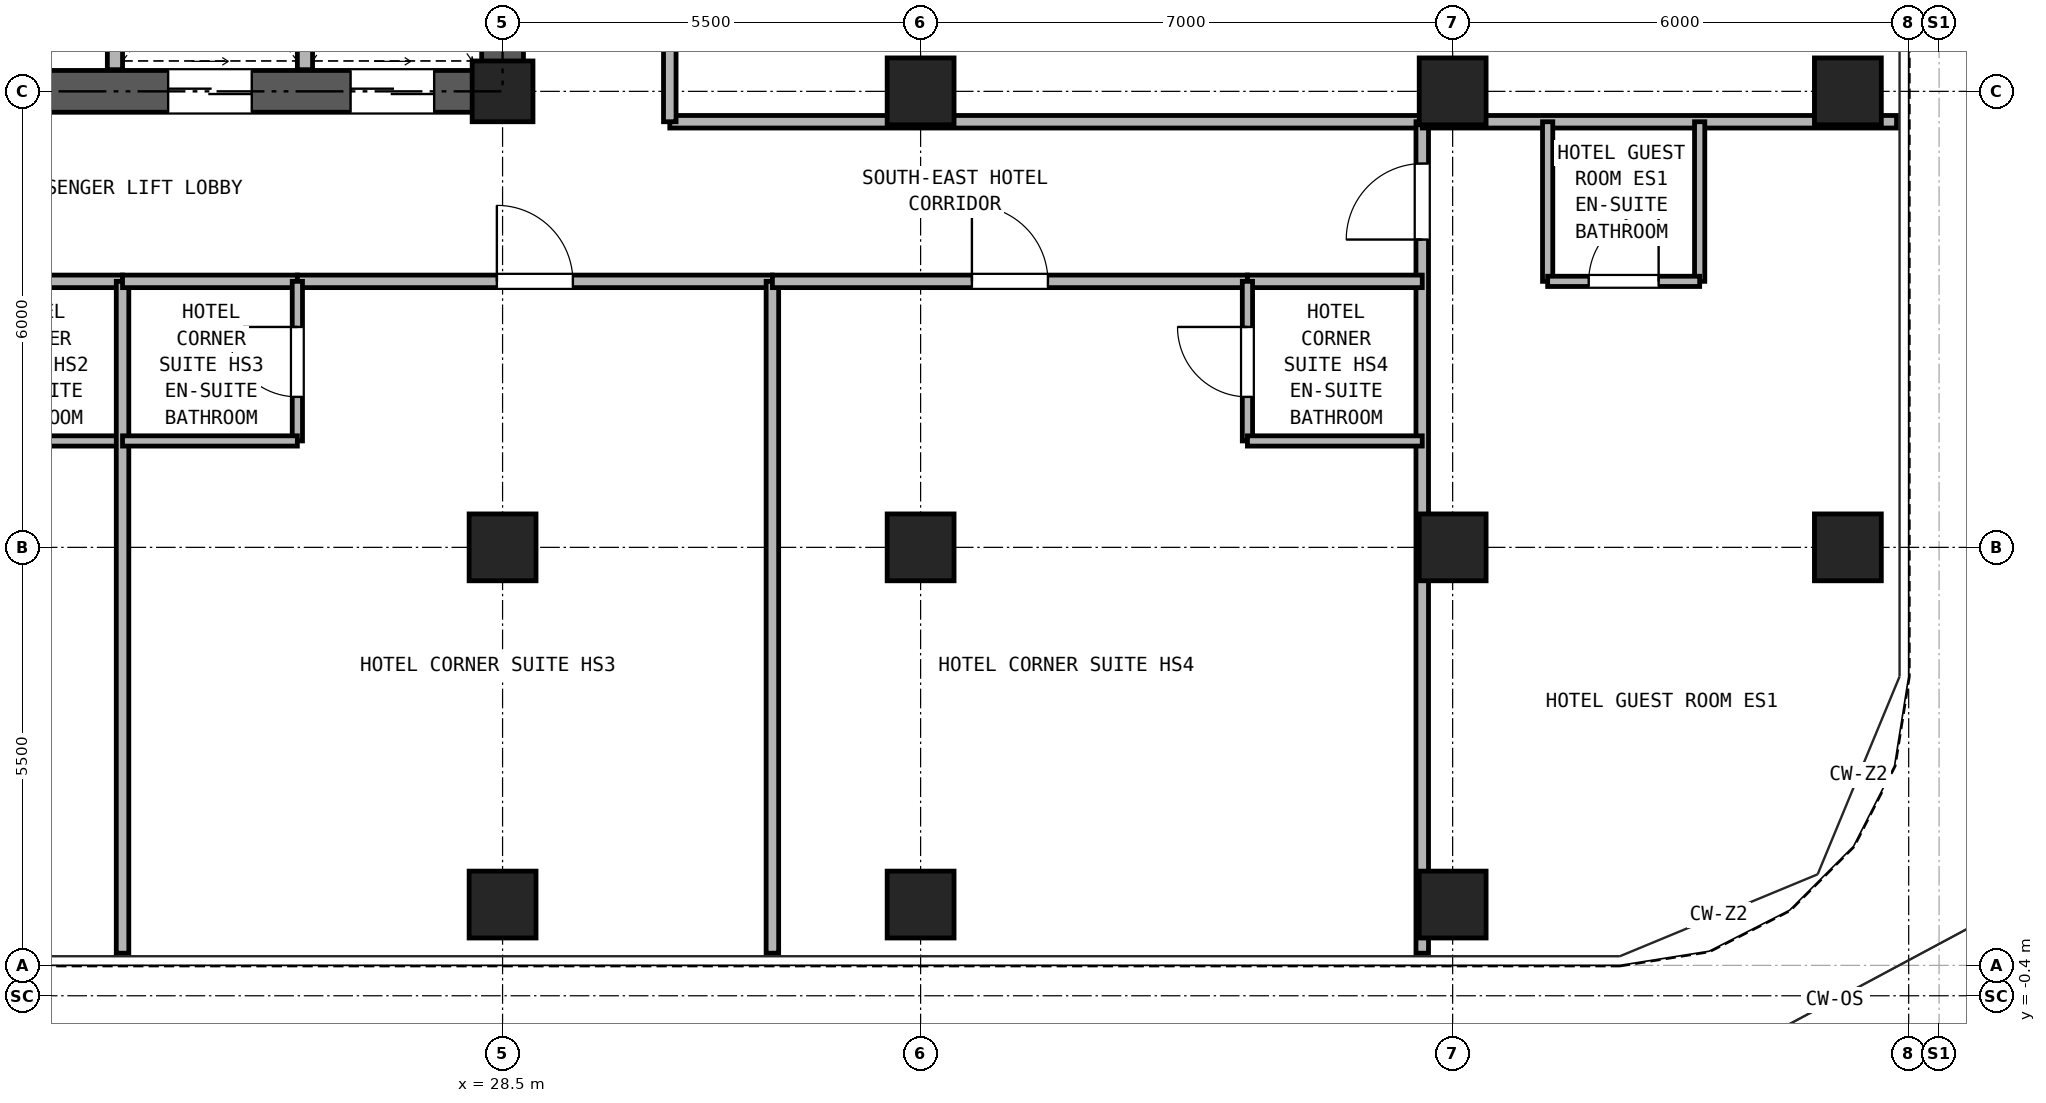
"""IFC4 building model, lengths in metres.
Left out: names, types, materials, properties, quantities, classifications, styles, units other than length and angle.
Written with IfcOpenShell. Run it as: python <this file> out.ifc"""

import sys

from ifc_helpers import new_model, si_unit, direction, frame, frame_2d, origin, origin_2d, place, context, subcontext, project, spatial, rectangle, hollow_rectangle, extrude, source, transform, mapped, element, fill, save


model = new_model("IFC4")
c1 = context("Model", 3, precision=1e-05, world=origin(), true_north=direction((0.0, 1.0)))
c2 = subcontext(c1, "Body", "Model", "MODEL_VIEW")
j1 = project(units=[si_unit("LENGTHUNIT", "METRE"), si_unit("PLANEANGLEUNIT", "RADIAN")], contexts=[c1])
p1 = place(None, origin())
s1 = spatial("IfcSite", under=j1, at=p1, CompositionType="ELEMENT")
p2 = place(p1, origin())
s2 = spatial("IfcBuilding", under=s1, at=p2, CompositionType="ELEMENT")
p3 = place(p2, frame((0.0, 0.0, 108.7)))
s3 = spatial("IfcBuildingStorey", under=s2, at=p3, CompositionType="ELEMENT", Elevation=108.7)
m1 = source(origin(), c2, "Body", "SweptSolid", [
    extrude(hollow_rectangle(XDim=0.88, YDim=0.88, WallThickness=0.05, at=origin_2d()), origin(), (0.0, 0.0, 1.0), 2.95),
])
for number, where, z_axis, x_axis in (
    (1, (28.5, 0.8, 0.0), (0.0, 0.0, 1.0), (1.0, 0.0, 0.0)),
    (2, (34.0, 0.8, 0.0), (0.0, 0.0, 1.0), (1.0, 0.0, 0.0)),
    (3, (41.0, 0.8, 0.0), (0.0, 0.0, 1.0), (1.0, 0.0, 0.0)),
    (4, (46.2, 5.5, 0.0), (0.0, 0.0, 1.0), (1.0, 0.0, 0.0)),
    (5, (46.2, 11.5, 0.0), (0.0, 0.0, 1.0), (1.0, 0.0, 0.0)),
    (6, (28.5, 5.5, 0.0), (0.0, 0.0, 1.0), (1.0, 0.0, 0.0)),
):
    element("IfcColumn", number, at=place(p3, frame(where, z_axis=z_axis, x_axis=x_axis)), inside=s3, PredefinedType="COLUMN", context=c2, shape_type="MappedRepresentation", body=[
        mapped(m1, transform((0.0, 0.0, 0.0), x_axis=(1.0, 0.0, 0.0), y_axis=(0.0, 1.0, 0.0), z_axis=(0.0, 0.0, 1.0), scale=1.0)),
    ])
m2 = source(origin(), c2, "Body", "SweptSolid", [
    extrude(hollow_rectangle(XDim=0.8, YDim=0.8, WallThickness=0.045, at=origin_2d()), origin(), (0.0, 0.0, 1.0), 2.95),
])
p4 = place(p3, frame((28.5, 11.5, 0.0), z_axis=(0.0, 0.0, 1.0), x_axis=(1.0, 0.0, 0.0)))
e7 = element("IfcColumn", 7, at=p4, inside=s3, PredefinedType="COLUMN", context=c2, shape_type="MappedRepresentation", body=[
    mapped(m2, transform((0.0, 0.0, 0.0), x_axis=(1.0, 0.0, 0.0), y_axis=(0.0, 1.0, 0.0), z_axis=(0.0, 0.0, 1.0), scale=1.0)),
])
for number, where, z_axis, x_axis in (
    (8, (34.0, 5.5, 0.0), (0.0, 0.0, 1.0), (1.0, 0.0, 0.0)),
    (9, (34.0, 11.5, 0.0), (0.0, 0.0, 1.0), (1.0, 0.0, 0.0)),
    (10, (41.0, 5.5, 0.0), (0.0, 0.0, 1.0), (1.0, 0.0, 0.0)),
    (11, (41.0, 11.5, 0.0), (0.0, 0.0, 1.0), (1.0, 0.0, 0.0)),
):
    element("IfcColumn", number, at=place(p3, frame(where, z_axis=z_axis, x_axis=x_axis)), inside=s3, PredefinedType="COLUMN", context=c2, shape_type="MappedRepresentation", body=[
        mapped(m1, transform((0.0, 0.0, 0.0), x_axis=(1.0, 0.0, 0.0), y_axis=(0.0, 1.0, 0.0), z_axis=(0.0, 0.0, 1.0), scale=1.0)),
    ])
p5 = place(p3, frame((18.225, 11.5, 0.0), z_axis=(0.0, 0.0, 1.0), x_axis=(1.0, 0.0, 0.0)))
e12 = element("IfcWall", 12, at=p5, inside=s3, PredefinedType="SHEAR", context=c2, shape_type="SweptSolid", body=[
    extrude(rectangle(XDim=10.55, YDim=0.55, at=frame_2d((5.275, 0.0))), origin(), (0.0, 0.0, 1.0), 2.95),
])
p6 = place(p5, frame((2.375, 0.0, 0.0)))
e13 = element("IfcOpeningElement", 13, at=p6, cuts=e12, PredefinedType="OPENING", context=c2, shape_type="SweptSolid", body=[
    extrude(rectangle(XDim=0.95, YDim=2.15, at=frame_2d((0.475, 1.075))), frame((0.0, 0.285, 0.0), z_axis=(0.0, -1.0, 0.0), x_axis=(1.0, 0.0, 0.0)), (0.0, 0.0, 1.0), 0.57),
])
p7 = place(p5, frame((5.875, 0.0, 0.0)))
e14 = element("IfcOpeningElement", 14, at=p7, cuts=e12, PredefinedType="OPENING", context=c2, shape_type="SweptSolid", body=[
    extrude(rectangle(XDim=1.1, YDim=2.25, at=frame_2d((0.55, 1.125))), frame((0.0, 0.285, 0.0), z_axis=(0.0, -1.0, 0.0), x_axis=(1.0, 0.0, 0.0)), (0.0, 0.0, 1.0), 0.57),
])
p8 = place(p5, frame((8.275, 0.0, 0.0)))
e15 = element("IfcOpeningElement", 15, at=p8, cuts=e12, PredefinedType="OPENING", context=c2, shape_type="SweptSolid", body=[
    extrude(rectangle(XDim=1.1, YDim=2.25, at=frame_2d((0.55, 1.125))), frame((0.0, 0.285, 0.0), z_axis=(0.0, -1.0, 0.0), x_axis=(1.0, 0.0, 0.0)), (0.0, 0.0, 1.0), 0.57),
])
p9 = place(p3, frame((28.5, 11.775, 0.0), z_axis=(0.0, 0.0, 1.0), x_axis=(0.0, 1.0, 0.0)))
e16 = element("IfcWall", 16, at=p9, inside=s3, PredefinedType="SHEAR", context=c2, shape_type="SweptSolid", body=[
    extrude(rectangle(XDim=16.7, YDim=0.55, at=frame_2d((8.35, 0.0))), origin(), (0.0, 0.0, 1.0), 2.95),
])
p10 = place(p9, frame((7.375, 0.0, 0.0)))
e17 = element("IfcOpeningElement", 17, at=p10, cuts=e16, PredefinedType="OPENING", context=c2, shape_type="SweptSolid", body=[
    extrude(rectangle(XDim=1.15, YDim=2.2, at=frame_2d((0.575, 1.1))), frame((0.0, 0.285, 0.0), z_axis=(0.0, -1.0, 0.0), x_axis=(1.0, 0.0, 0.0)), (0.0, 0.0, 1.0), 0.57),
])
for number, where, z_axis, x_axis in (
    (18, (23.4, 11.785, 0.0), (0.0, 0.0, 1.0), (0.0, 1.0, 0.0)),
    (19, (25.9, 11.785, 0.0), (0.0, 0.0, 1.0), (0.0, 1.0, 0.0)),
):
    element("IfcWall", number, at=place(p3, frame(where, z_axis=z_axis, x_axis=x_axis)), inside=s3, PredefinedType="PARTITIONING", context=c2, shape_type="SweptSolid", body=[
        extrude(rectangle(XDim=3.215, YDim=0.2, at=frame_2d((1.607, 0.0))), origin(), (0.0, 0.0, 1.0), 2.95),
    ])
p11 = place(p3, frame((30.7, 11.1, 0.0), z_axis=(0.0, 0.0, 1.0), x_axis=(1.0, 0.0, 0.0)))
e20 = element("IfcWall", 20, at=p11, inside=s3, PredefinedType="PARTITIONING", context=c2, shape_type="SweptSolid", body=[
    extrude(rectangle(XDim=9.9, YDim=0.165, at=frame_2d((4.95, 0.0))), origin(), (0.0, 0.0, 1.0), 2.95),
])
p12 = place(p3, frame((30.7, 11.1, 0.0), z_axis=(0.0, 0.0, 1.0), x_axis=(0.0, 1.0, 0.0)))
e21 = element("IfcWall", 21, at=p12, inside=s3, PredefinedType="PARTITIONING", context=c2, shape_type="SweptSolid", body=[
    extrude(rectangle(XDim=18.45, YDim=0.165, at=frame_2d((9.225, 0.0))), origin(), (0.0, 0.0, 1.0), 2.95),
])
p13 = place(p12, frame((4.112, 0.0, 0.0)))
e22 = element("IfcOpeningElement", 22, at=p13, cuts=e21, PredefinedType="OPENING", context=c2, shape_type="SweptSolid", body=[
    extrude(rectangle(XDim=0.95, YDim=2.15, at=frame_2d((0.475, 1.075))), frame((0.0, 0.093, 0.0), z_axis=(0.0, -1.0, 0.0), x_axis=(1.0, 0.0, 0.0)), (0.0, 0.0, 1.0), 0.185),
])
p14 = place(p12, frame((13.338, 0.0, 0.0)))
e23 = element("IfcOpeningElement", 23, at=p14, cuts=e21, PredefinedType="OPENING", context=c2, shape_type="SweptSolid", body=[
    extrude(rectangle(XDim=0.95, YDim=2.15, at=frame_2d((0.475, 1.075))), frame((0.0, 0.093, 0.0), z_axis=(0.0, -1.0, 0.0), x_axis=(1.0, 0.0, 0.0)), (0.0, 0.0, 1.0), 0.185),
])
p15 = place(p3, frame((40.6, 0.16, 0.0), z_axis=(0.0, 0.0, 1.0), x_axis=(0.0, 1.0, 0.0)))
e24 = element("IfcWall", 24, at=p15, inside=s3, PredefinedType="PARTITIONING", context=c2, shape_type="SweptSolid", body=[
    extrude(rectangle(XDim=10.94, YDim=0.165, at=frame_2d((5.47, 0.0))), origin(), (0.0, 0.0, 1.0), 2.95),
])
p16 = place(p15, frame((9.39, 0.0, 0.0)))
e25 = element("IfcOpeningElement", 25, at=p16, cuts=e24, PredefinedType="OPENING", context=c2, shape_type="SweptSolid", body=[
    extrude(rectangle(XDim=1.0, YDim=2.15, at=frame_2d((0.5, 1.075))), frame((0.0, 0.093, 0.0), z_axis=(0.0, -1.0, 0.0), x_axis=(1.0, 0.0, 0.0)), (0.0, 0.0, 1.0), 0.185),
])
p17 = place(p3, frame((40.6, 11.1, 0.0), z_axis=(0.0, 0.0, 1.0), x_axis=(1.0, 0.0, 0.0)))
e26 = element("IfcWall", 26, at=p17, inside=s3, PredefinedType="PARTITIONING", context=c2, shape_type="SweptSolid", body=[
    extrude(rectangle(XDim=6.24, YDim=0.165, at=frame_2d((3.12, 0.0))), origin(), (0.0, 0.0, 1.0), 2.95),
])
for number, where, z_axis, x_axis in (
    (27, (42.25, 9.0, 0.0), (0.0, 0.0, 1.0), (0.0, 1.0, 0.0)),
    (28, (44.25, 9.0, 0.0), (0.0, 0.0, 1.0), (0.0, 1.0, 0.0)),
):
    element("IfcWall", number, at=place(p3, frame(where, z_axis=z_axis, x_axis=x_axis)), inside=s3, PredefinedType="PARTITIONING", context=c2, shape_type="SweptSolid", body=[
        extrude(rectangle(XDim=2.1, YDim=0.135, at=frame_2d((1.05, 0.0))), origin(), (0.0, 0.0, 1.0), 2.95),
    ])
p18 = place(p3, frame((42.25, 9.0, 0.0), z_axis=(0.0, 0.0, 1.0), x_axis=(1.0, 0.0, 0.0)))
e29 = element("IfcWall", 29, at=p18, inside=s3, PredefinedType="PARTITIONING", context=c2, shape_type="SweptSolid", body=[
    extrude(rectangle(XDim=2.0, YDim=0.135, at=frame_2d((1.0, 0.0))), origin(), (0.0, 0.0, 1.0), 2.95),
])
p19 = place(p18, frame((0.54, 0.0, 0.0)))
e30 = element("IfcOpeningElement", 30, at=p19, cuts=e29, PredefinedType="OPENING", context=c2, shape_type="SweptSolid", body=[
    extrude(rectangle(XDim=0.92, YDim=2.1, at=frame_2d((0.46, 1.05))), frame((0.0, 0.077, 0.0), z_axis=(0.0, -1.0, 0.0), x_axis=(1.0, 0.0, 0.0)), (0.0, 0.0, 1.0), 0.155),
])
p20 = place(p3, frame((21.2, 9.0, 0.0), z_axis=(0.0, 0.0, 1.0), x_axis=(1.0, 0.0, 0.0)))
e31 = element("IfcWall", 31, at=p20, inside=s3, PredefinedType="PARTITIONING", context=c2, shape_type="SweptSolid", body=[
    extrude(rectangle(XDim=2.3, YDim=0.165, at=frame_2d((1.15, 0.0))), origin(), (0.0, 0.0, 1.0), 2.95),
])
p21 = place(p3, frame((21.2, 6.9, 0.0), z_axis=(0.0, 0.0, 1.0), x_axis=(1.0, 0.0, 0.0)))
e32 = element("IfcWall", 32, at=p21, inside=s3, PredefinedType="PARTITIONING", context=c2, shape_type="SweptSolid", body=[
    extrude(rectangle(XDim=2.3, YDim=0.135, at=frame_2d((1.15, 0.0))), origin(), (0.0, 0.0, 1.0), 2.95),
])
p22 = place(p3, frame((23.5, 0.16, 0.0), z_axis=(0.0, 0.0, 1.0), x_axis=(0.0, 1.0, 0.0)))
e33 = element("IfcWall", 33, at=p22, inside=s3, PredefinedType="PARTITIONING", context=c2, shape_type="SweptSolid", body=[
    extrude(rectangle(XDim=8.84, YDim=0.165, at=frame_2d((4.42, 0.0))), origin(), (0.0, 0.0, 1.0), 2.95),
])
p23 = place(p3, frame((23.5, 9.0, 0.0), z_axis=(0.0, 0.0, 1.0), x_axis=(1.0, 0.0, 0.0)))
e34 = element("IfcWall", 34, at=p23, inside=s3, PredefinedType="PARTITIONING", context=c2, shape_type="SweptSolid", body=[
    extrude(rectangle(XDim=2.3, YDim=0.165, at=frame_2d((1.15, 0.0))), origin(), (0.0, 0.0, 1.0), 2.95),
])
p24 = place(p3, frame((25.8, 9.0, 0.0), z_axis=(0.0, 0.0, 1.0), x_axis=(1.0, 0.0, 0.0)))
e35 = element("IfcWall", 35, at=p24, inside=s3, PredefinedType="PARTITIONING", context=c2, shape_type="SweptSolid", body=[
    extrude(rectangle(XDim=6.25, YDim=0.165, at=frame_2d((3.125, 0.0))), origin(), (0.0, 0.0, 1.0), 2.95),
])
p25 = place(p24, frame((2.625, 0.0, 0.0)))
e36 = element("IfcOpeningElement", 36, at=p25, cuts=e35, PredefinedType="OPENING", context=c2, shape_type="SweptSolid", body=[
    extrude(rectangle(XDim=1.0, YDim=2.15, at=frame_2d((0.5, 1.075))), frame((0.0, 0.093, 0.0), z_axis=(0.0, -1.0, 0.0), x_axis=(1.0, 0.0, 0.0)), (0.0, 0.0, 1.0), 0.185),
])
p26 = place(p3, frame((25.8, 6.9, 0.0), z_axis=(0.0, 0.0, 1.0), x_axis=(0.0, 1.0, 0.0)))
e37 = element("IfcWall", 37, at=p26, inside=s3, PredefinedType="PARTITIONING", context=c2, shape_type="SweptSolid", body=[
    extrude(rectangle(XDim=2.1, YDim=0.135, at=frame_2d((1.05, 0.0))), origin(), (0.0, 0.0, 1.0), 2.95),
])
p27 = place(p26, frame((0.58, 0.0, 0.0)))
e38 = element("IfcOpeningElement", 38, at=p27, cuts=e37, PredefinedType="OPENING", context=c2, shape_type="SweptSolid", body=[
    extrude(rectangle(XDim=0.92, YDim=2.1, at=frame_2d((0.46, 1.05))), frame((0.0, 0.077, 0.0), z_axis=(0.0, -1.0, 0.0), x_axis=(1.0, 0.0, 0.0)), (0.0, 0.0, 1.0), 0.155),
])
p28 = place(p3, frame((23.5, 6.9, 0.0), z_axis=(0.0, 0.0, 1.0), x_axis=(1.0, 0.0, 0.0)))
e39 = element("IfcWall", 39, at=p28, inside=s3, PredefinedType="PARTITIONING", context=c2, shape_type="SweptSolid", body=[
    extrude(rectangle(XDim=2.3, YDim=0.135, at=frame_2d((1.15, 0.0))), origin(), (0.0, 0.0, 1.0), 2.95),
])
p29 = place(p3, frame((32.05, 0.16, 0.0), z_axis=(0.0, 0.0, 1.0), x_axis=(0.0, 1.0, 0.0)))
e40 = element("IfcWall", 40, at=p29, inside=s3, PredefinedType="PARTITIONING", context=c2, shape_type="SweptSolid", body=[
    extrude(rectangle(XDim=8.84, YDim=0.165, at=frame_2d((4.42, 0.0))), origin(), (0.0, 0.0, 1.0), 2.95),
])
p30 = place(p3, frame((38.3, 9.0, 0.0), z_axis=(0.0, 0.0, 1.0), x_axis=(1.0, 0.0, 0.0)))
e41 = element("IfcWall", 41, at=p30, inside=s3, PredefinedType="PARTITIONING", context=c2, shape_type="SweptSolid", body=[
    extrude(rectangle(XDim=2.3, YDim=0.165, at=frame_2d((1.15, 0.0))), origin(), (0.0, 0.0, 1.0), 2.95),
])
p31 = place(p3, frame((32.05, 9.0, 0.0), z_axis=(0.0, 0.0, 1.0), x_axis=(1.0, 0.0, 0.0)))
e42 = element("IfcWall", 42, at=p31, inside=s3, PredefinedType="PARTITIONING", context=c2, shape_type="SweptSolid", body=[
    extrude(rectangle(XDim=6.25, YDim=0.165, at=frame_2d((3.125, 0.0))), origin(), (0.0, 0.0, 1.0), 2.95),
])
p32 = place(p31, frame((2.625, 0.0, 0.0)))
e43 = element("IfcOpeningElement", 43, at=p32, cuts=e42, PredefinedType="OPENING", context=c2, shape_type="SweptSolid", body=[
    extrude(rectangle(XDim=1.0, YDim=2.15, at=frame_2d((0.5, 1.075))), frame((0.0, 0.093, 0.0), z_axis=(0.0, -1.0, 0.0), x_axis=(1.0, 0.0, 0.0)), (0.0, 0.0, 1.0), 0.185),
])
p33 = place(p3, frame((38.3, 6.9, 0.0), z_axis=(0.0, 0.0, 1.0), x_axis=(0.0, 1.0, 0.0)))
e44 = element("IfcWall", 44, at=p33, inside=s3, PredefinedType="PARTITIONING", context=c2, shape_type="SweptSolid", body=[
    extrude(rectangle(XDim=2.1, YDim=0.135, at=frame_2d((1.05, 0.0))), origin(), (0.0, 0.0, 1.0), 2.95),
])
p34 = place(p33, frame((0.58, 0.0, 0.0)))
e45 = element("IfcOpeningElement", 45, at=p34, cuts=e44, PredefinedType="OPENING", context=c2, shape_type="SweptSolid", body=[
    extrude(rectangle(XDim=0.92, YDim=2.1, at=frame_2d((0.46, 1.05))), frame((0.0, 0.077, 0.0), z_axis=(0.0, -1.0, 0.0), x_axis=(1.0, 0.0, 0.0)), (0.0, 0.0, 1.0), 0.155),
])
p35 = place(p3, frame((38.3, 6.9, 0.0), z_axis=(0.0, 0.0, 1.0), x_axis=(1.0, 0.0, 0.0)))
e46 = element("IfcWall", 46, at=p35, inside=s3, PredefinedType="PARTITIONING", context=c2, shape_type="SweptSolid", body=[
    extrude(rectangle(XDim=2.3, YDim=0.135, at=frame_2d((1.15, 0.0))), origin(), (0.0, 0.0, 1.0), 2.95),
])
p36 = place(p7, frame((1.1, 0.0, 0.0), z_axis=(0.0, 0.0, 1.0), x_axis=(-1.0, 0.0, 0.0)))
e47 = element("IfcDoor", 47, at=p36, inside=s3, OperationType="DOUBLE_DOOR_SLIDING", PredefinedType="DOOR", context=c2, shape_type="SweptSolid", body=[
    extrude(rectangle(XDim=1.1, YDim=2.25, at=frame_2d((0.55, 1.125))), frame((0.0, 0.025, 0.0), z_axis=(0.0, -1.0, 0.0), x_axis=(1.0, 0.0, 0.0)), (0.0, 0.0, 1.0), 0.05),
])
fill(e14, e47)
p37 = place(p8, frame((1.1, 0.0, 0.0), z_axis=(0.0, 0.0, 1.0), x_axis=(-1.0, 0.0, 0.0)))
e48 = element("IfcDoor", 48, at=p37, inside=s3, OperationType="DOUBLE_DOOR_SLIDING", PredefinedType="DOOR", context=c2, shape_type="SweptSolid", body=[
    extrude(rectangle(XDim=1.1, YDim=2.25, at=frame_2d((0.55, 1.125))), frame((0.0, 0.025, 0.0), z_axis=(0.0, -1.0, 0.0), x_axis=(1.0, 0.0, 0.0)), (0.0, 0.0, 1.0), 0.05),
])
fill(e15, e48)
p38 = place(p19, origin())
e49 = element("IfcDoor", 49, at=p38, inside=s3, OperationType="SINGLE_SWING_RIGHT", PredefinedType="DOOR", context=c2, shape_type="SweptSolid", body=[
    extrude(rectangle(XDim=0.92, YDim=2.1, at=frame_2d((0.46, 1.05))), frame((0.0, 0.025, 0.0), z_axis=(0.0, -1.0, 0.0), x_axis=(1.0, 0.0, 0.0)), (0.0, 0.0, 1.0), 0.05),
])
fill(e30, e49)
p39 = place(p16, frame((1.0, 0.0, 0.0), z_axis=(0.0, 0.0, 1.0), x_axis=(-1.0, 0.0, 0.0)))
e50 = element("IfcDoor", 50, at=p39, inside=s3, OperationType="SINGLE_SWING_LEFT", PredefinedType="DOOR", context=c2, shape_type="SweptSolid", body=[
    extrude(rectangle(XDim=1.0, YDim=2.15, at=frame_2d((0.5, 1.075))), frame((0.0, 0.025, 0.0), z_axis=(0.0, -1.0, 0.0), x_axis=(1.0, 0.0, 0.0)), (0.0, 0.0, 1.0), 0.05),
])
fill(e25, e50)
p40 = place(p27, frame((0.92, 0.0, 0.0), z_axis=(0.0, 0.0, 1.0), x_axis=(-1.0, 0.0, 0.0)))
e51 = element("IfcDoor", 51, at=p40, inside=s3, OperationType="SINGLE_SWING_RIGHT", PredefinedType="DOOR", context=c2, shape_type="SweptSolid", body=[
    extrude(rectangle(XDim=0.92, YDim=2.1, at=frame_2d((0.46, 1.05))), frame((0.0, 0.025, 0.0), z_axis=(0.0, -1.0, 0.0), x_axis=(1.0, 0.0, 0.0)), (0.0, 0.0, 1.0), 0.05),
])
fill(e38, e51)
p41 = place(p25, frame((1.0, 0.0, 0.0), z_axis=(0.0, 0.0, 1.0), x_axis=(-1.0, 0.0, 0.0)))
e52 = element("IfcDoor", 52, at=p41, inside=s3, OperationType="SINGLE_SWING_LEFT", PredefinedType="DOOR", context=c2, shape_type="SweptSolid", body=[
    extrude(rectangle(XDim=1.0, YDim=2.15, at=frame_2d((0.5, 1.075))), frame((0.0, 0.025, 0.0), z_axis=(0.0, -1.0, 0.0), x_axis=(1.0, 0.0, 0.0)), (0.0, 0.0, 1.0), 0.05),
])
fill(e36, e52)
p42 = place(p34, origin())
e53 = element("IfcDoor", 53, at=p42, inside=s3, OperationType="SINGLE_SWING_RIGHT", PredefinedType="DOOR", context=c2, shape_type="SweptSolid", body=[
    extrude(rectangle(XDim=0.92, YDim=2.1, at=frame_2d((0.46, 1.05))), frame((0.0, 0.025, 0.0), z_axis=(0.0, -1.0, 0.0), x_axis=(1.0, 0.0, 0.0)), (0.0, 0.0, 1.0), 0.05),
])
fill(e45, e53)
p43 = place(p32, frame((1.0, 0.0, 0.0), z_axis=(0.0, 0.0, 1.0), x_axis=(-1.0, 0.0, 0.0)))
e54 = element("IfcDoor", 54, at=p43, inside=s3, OperationType="SINGLE_SWING_LEFT", PredefinedType="DOOR", context=c2, shape_type="SweptSolid", body=[
    extrude(rectangle(XDim=1.0, YDim=2.15, at=frame_2d((0.5, 1.075))), frame((0.0, 0.025, 0.0), z_axis=(0.0, -1.0, 0.0), x_axis=(1.0, 0.0, 0.0)), (0.0, 0.0, 1.0), 0.05),
])
fill(e43, e54)
save(model, sys.argv[1])
